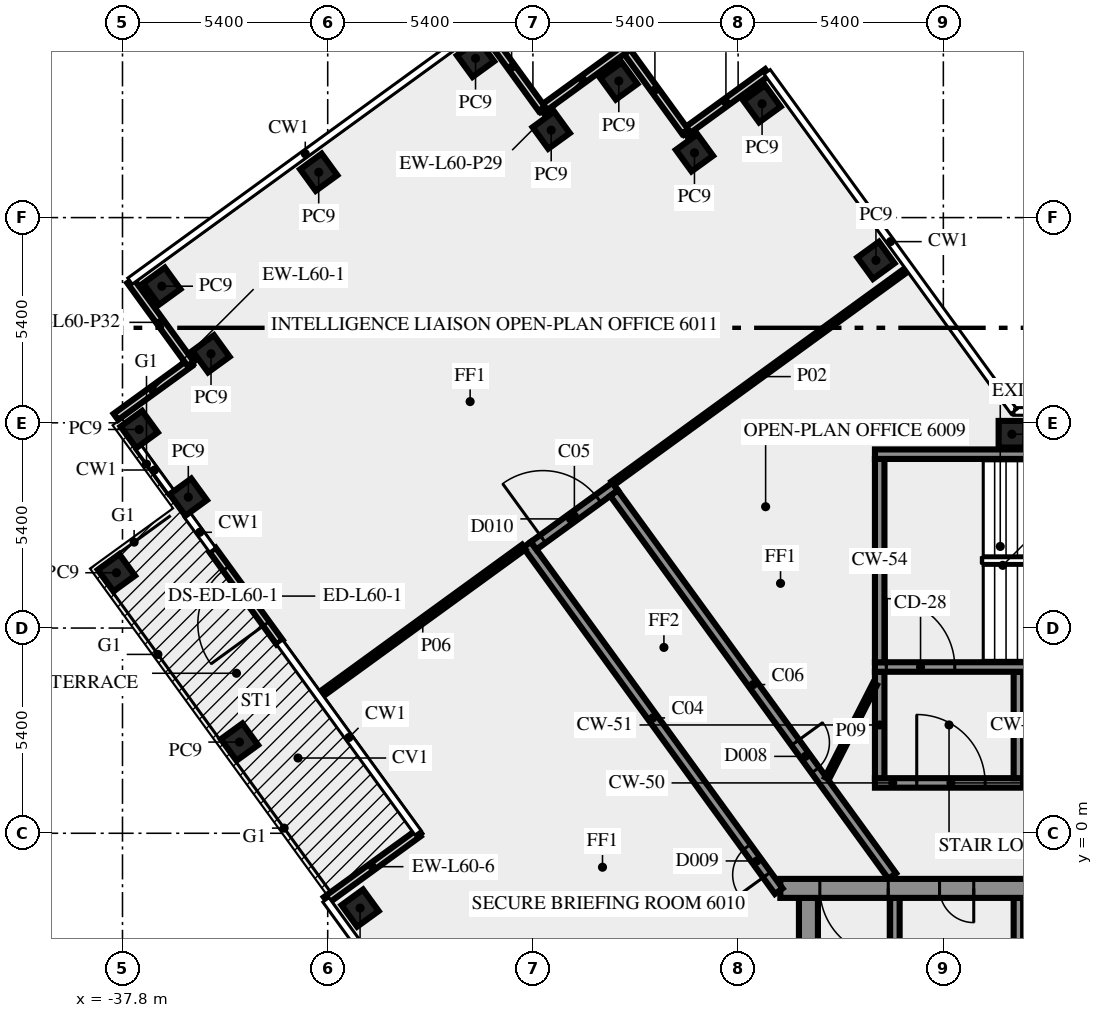
"""IFC4 building model, lengths in metres.
Left out: names, types, materials, properties, quantities, classifications, styles, units other than length and angle.
Written with IfcOpenShell. Run it as: python <this file> out.ifc"""

import sys

from ifc_helpers import new_model, si_unit, direction, frame, frame_2d, origin, origin_2d, place, context, subcontext, project, spatial, rectangle, extrude, element, fill, save


model = new_model("IFC4")
c1 = context("Model", 3, precision=1e-05, world=origin(), true_north=direction((0.0, 1.0)))
c2 = subcontext(c1, "Body", "Model", "MODEL_VIEW")
j1 = project(units=[si_unit("LENGTHUNIT", "METRE"), si_unit("PLANEANGLEUNIT", "RADIAN")], contexts=[c1])
p1 = place(None, origin())
s1 = spatial("IfcSite", under=j1, at=p1, CompositionType="ELEMENT")
p2 = place(p1, origin())
s2 = spatial("IfcBuilding", under=s1, at=p2, CompositionType="ELEMENT")
p3 = place(p2, frame((0.0, 0.0, 257.0)))
s3 = spatial("IfcBuildingStorey", under=s2, at=p3, CompositionType="ELEMENT", Elevation=257.0)
for number, where, z_axis, x_axis in (
    (1, (-17.974, 15.075, 0.0), (0.0, 0.0, 1.0), (-0.588, 0.809, 0.0)),
    (2, (-20.97, 19.195, 0.0), (0.0, 0.0, 1.0), (-0.588, 0.809, 0.0)),
    (3, (-22.749, 17.904, 0.0), (0.0, 0.0, 1.0), (-0.588, 0.809, 0.0)),
    (4, (-24.74, 19.795, 0.0), (0.0, 0.0, 1.0), (-0.588, 0.809, 0.0)),
    (5, (-26.519, 18.5, 0.0), (0.0, 0.0, 1.0), (-0.588, 0.809, 0.0)),
    (6, (-28.51, 20.39, 0.0), (0.0, 0.0, 1.0), (-0.809, -0.588, 0.0)),
    (7, (-32.637, 17.393, 0.0), (0.0, 0.0, 1.0), (-0.809, -0.588, 0.0)),
    (8, (-36.765, 14.395, 0.0), (0.0, 0.0, 1.0), (0.588, -0.809, 0.0)),
    (9, (-35.471, 12.616, 0.0), (0.0, 0.0, 1.0), (-0.809, -0.588, 0.0)),
    (10, (-37.36, 10.625, 0.0), (0.0, 0.0, 1.0), (0.588, -0.809, 0.0)),
    (11, (-36.068, 8.844, 0.0), (0.0, 0.0, 1.0), (0.588, -0.809, 0.0)),
    (12, (-37.96, 6.855, 0.0), (0.0, 0.0, 1.0), (0.588, -0.809, 0.0)),
    (13, (-34.722, 2.4, 0.0), (0.0, 0.0, 1.0), (0.588, -0.809, 0.0)),
    (14, (-31.548, -1.969, 0.0), (0.0, 0.0, 1.0), (0.588, -0.809, 0.0)),
    (15, (-14.395, 10.5, 0.0), (0.0, 0.0, 1.0), (-1.0, 0.0, 0.0)),
):
    element("IfcColumn", number, at=place(p3, frame(where, z_axis=z_axis, x_axis=x_axis)), inside=s3, PredefinedType="COLUMN", context=c2, shape_type="SweptSolid", body=[
        extrude(rectangle(XDim=0.7, YDim=0.7, at=origin_2d()), origin(), (0.0, 0.0, 1.0), 3.65),
    ])
p4 = place(p3, frame((-36.032, 12.369, 0.0), z_axis=(0.0, 0.0, 1.0), x_axis=(-0.809026317077, -0.587772420479, 0.0)))
e16 = element("IfcWall", 16, at=p4, inside=s3, PredefinedType="SOLIDWALL", context=c2, shape_type="SweptSolid", body=[
    extrude(rectangle(XDim=2.4, YDim=0.2, at=frame_2d((1.2, 0.0))), origin(), (0.0, 0.0, 1.0), 3.65),
])
p5 = place(p3, frame((-33.665, 5.028, 0.0), z_axis=(0.0, 0.0, 1.0), x_axis=(-0.587755461469, 0.809038637837, 0.0)))
e17 = element("IfcWall", 17, at=p5, inside=s3, PredefinedType="SOLIDWALL", context=c2, shape_type="SweptSolid", body=[
    extrude(rectangle(XDim=3.0, YDim=0.2, at=frame_2d((1.5, 0.0))), origin(), (0.0, 0.0, 1.0), 3.65),
])
p6 = place(p5, frame((0.6, 0.0, 0.0)))
e18 = element("IfcOpeningElement", 18, at=p6, cuts=e17, PredefinedType="OPENING", context=c2, shape_type="SweptSolid", body=[
    extrude(rectangle(XDim=1.8, YDim=2.4, at=frame_2d((0.9, 1.2))), frame((0.0, 0.11, 0.0), z_axis=(0.0, -1.0, 0.0), x_axis=(1.0, 0.0, 0.0)), (0.0, 0.0, 1.0), 0.22),
])
p7 = place(p3, frame((-30.014, 0.002, 0.0), z_axis=(0.0, 0.0, 1.0), x_axis=(-0.808999938455, -0.587808727036, 0.0)))
e19 = element("IfcWall", 19, at=p7, inside=s3, PredefinedType="SOLIDWALL", context=c2, shape_type="SweptSolid", body=[
    extrude(rectangle(XDim=3.0, YDim=0.2, at=frame_2d((1.5, 0.0))), origin(), (0.0, 0.0, 1.0), 3.65),
])
for number, where, z_axis, x_axis in (
    (20, (-20.829, 20.025, 0.0), (0.0, 0.0, 1.0), (-0.809, -0.588, 0.0)),
    (21, (-22.996, 18.466, 0.0), (0.0, 0.0, 1.0), (-0.588, 0.809, 0.0)),
):
    element("IfcWall", number, at=place(p3, frame(where, z_axis=z_axis, x_axis=x_axis)), inside=s3, PredefinedType="SOLIDWALL", context=c2, shape_type="SweptSolid", body=[
        extrude(rectangle(XDim=2.7, YDim=0.2, at=frame_2d((1.35, 0.0))), origin(), (0.0, 0.0, 1.0), 3.65),
    ])
for number, where, z_axis, x_axis in (
    (22, (-24.6, 20.623, 0.0), (0.0, 0.0, 1.0), (-0.809, -0.588, 0.0)),
    (23, (-26.768, 19.063, 0.0), (0.0, 0.0, 1.0), (-0.588, 0.809, 0.0)),
):
    element("IfcWall", number, at=place(p3, frame(where, z_axis=z_axis, x_axis=x_axis)), inside=s3, PredefinedType="SOLIDWALL", context=c2, shape_type="SweptSolid", body=[
        extrude(rectangle(XDim=2.7, YDim=0.2, at=frame_2d((1.35, 0.0))), origin(), (0.0, 0.0, 1.0), 3.65),
    ])
p8 = place(p3, frame((-37.592, 14.536, 0.0), z_axis=(0.0, 0.0, 1.0), x_axis=(0.587762999008, -0.809033161865, 0.0)))
e24 = element("IfcWall", 24, at=p8, inside=s3, PredefinedType="SOLIDWALL", context=c2, shape_type="SweptSolid", body=[
    extrude(rectangle(XDim=2.7, YDim=0.2, at=frame_2d((1.35, 0.0))), origin(), (0.0, 0.0, 1.0), 3.65),
])
p9 = place(p3, frame((-19.75, -10.5, 0.0), z_axis=(0.0, 0.0, 1.0), x_axis=(0.0, 1.0, 0.0)))
e25 = element("IfcWall", 25, at=p9, inside=s3, PredefinedType="SHEAR", context=c2, shape_type="SweptSolid", body=[
    extrude(rectangle(XDim=8.8, YDim=0.5, at=frame_2d((4.4, 0.0))), origin(), (0.0, 0.0, 1.0), 3.65),
])
p10 = place(p3, frame((-17.475, -6.0, 0.0), z_axis=(0.0, 0.0, 1.0), x_axis=(0.0, 1.0, 0.0)))
e26 = element("IfcWall", 26, at=p10, inside=s3, PredefinedType="SHEAR", context=c2, shape_type="SweptSolid", body=[
    extrude(rectangle(XDim=4.3, YDim=0.25, at=frame_2d((2.15, 0.0))), origin(), (0.0, 0.0, 1.0), 3.65),
])
p11 = place(p10, frame((0.55, 0.0, 0.0)))
e27 = element("IfcOpeningElement", 27, at=p11, cuts=e26, PredefinedType="OPENING", context=c2, shape_type="SweptSolid", body=[
    extrude(rectangle(XDim=1.3, YDim=2.1, at=frame_2d((0.65, 1.05))), frame((0.0, 0.135, 0.0), z_axis=(0.0, -1.0, 0.0), x_axis=(1.0, 0.0, 0.0)), (0.0, 0.0, 1.0), 0.27),
])
p12 = place(p3, frame((-14.225, -3.35, 0.0), z_axis=(0.0, 0.0, 1.0), x_axis=(0.0, 1.0, 0.0)))
e28 = element("IfcWall", 28, at=p12, inside=s3, PredefinedType="SHEAR", context=c2, shape_type="SweptSolid", body=[
    extrude(rectangle(XDim=1.65, YDim=0.25, at=frame_2d((0.825, 0.0))), origin(), (0.0, 0.0, 1.0), 3.65),
])
p13 = place(p3, frame((20.49, -1.45, 0.0), z_axis=(0.0, 0.0, 1.0), x_axis=(-1.0, 0.0, 0.0)))
e29 = element("IfcWall", 29, at=p13, inside=s3, PredefinedType="SHEAR", context=c2, shape_type="SweptSolid", body=[
    extrude(rectangle(XDim=40.98, YDim=0.5, at=frame_2d((20.49, 0.0))), origin(), (0.0, 0.0, 1.0), 3.65),
])
p14 = place(p13, frame((38.14, 0.0, 0.0)))
e30 = element("IfcOpeningElement", 30, at=p14, cuts=e29, PredefinedType="OPENING", context=c2, shape_type="SweptSolid", body=[
    extrude(rectangle(XDim=1.8, YDim=2.1, at=frame_2d((0.9, 1.05))), frame((0.0, 0.26, 0.0), z_axis=(0.0, -1.0, 0.0), x_axis=(1.0, 0.0, 0.0)), (0.0, 0.0, 1.0), 0.52),
])
p15 = place(p13, frame((35.89, 0.0, 0.0)))
e31 = element("IfcOpeningElement", 31, at=p15, cuts=e29, PredefinedType="OPENING", context=c2, shape_type="SweptSolid", body=[
    extrude(rectangle(XDim=0.9, YDim=2.1, at=frame_2d((0.45, 1.05))), frame((0.0, 0.26, 0.0), z_axis=(0.0, -1.0, 0.0), x_axis=(1.0, 0.0, 0.0)), (0.0, 0.0, 1.0), 0.52),
])
p16 = place(p13, frame((32.94, 0.0, 0.0)))
e32 = element("IfcOpeningElement", 32, at=p16, cuts=e29, PredefinedType="OPENING", context=c2, shape_type="SweptSolid", body=[
    extrude(rectangle(XDim=0.9, YDim=2.1, at=frame_2d((0.45, 1.05))), frame((0.0, 0.26, 0.0), z_axis=(0.0, -1.0, 0.0), x_axis=(1.0, 0.0, 0.0)), (0.0, 0.0, 1.0), 0.52),
])
p17 = place(p13, frame((31.015, 0.0, 0.0)))
e33 = element("IfcOpeningElement", 33, at=p17, cuts=e29, PredefinedType="OPENING", context=c2, shape_type="SweptSolid", body=[
    extrude(rectangle(XDim=0.8, YDim=2.1, at=frame_2d((0.4, 1.05))), frame((0.0, 0.26, 0.0), z_axis=(0.0, -1.0, 0.0), x_axis=(1.0, 0.0, 0.0)), (0.0, 0.0, 1.0), 0.52),
])
p18 = place(p13, frame((24.765, 0.0, 0.0)))
e34 = element("IfcOpeningElement", 34, at=p18, cuts=e29, PredefinedType="OPENING", context=c2, shape_type="SweptSolid", body=[
    extrude(rectangle(XDim=0.8, YDim=2.1, at=frame_2d((0.4, 1.05))), frame((0.0, 0.26, 0.0), z_axis=(0.0, -1.0, 0.0), x_axis=(1.0, 0.0, 0.0)), (0.0, 0.0, 1.0), 0.52),
])
p19 = place(p13, frame((21.765, 0.0, 0.0)))
e35 = element("IfcOpeningElement", 35, at=p19, cuts=e29, PredefinedType="OPENING", context=c2, shape_type="SweptSolid", body=[
    extrude(rectangle(XDim=2.0, YDim=2.1, at=frame_2d((1.0, 1.05))), frame((0.0, 0.26, 0.0), z_axis=(0.0, -1.0, 0.0), x_axis=(1.0, 0.0, 0.0)), (0.0, 0.0, 1.0), 0.52),
])
p20 = place(p13, frame((14.202, 0.0, 0.0)))
e36 = element("IfcOpeningElement", 36, at=p20, cuts=e29, PredefinedType="OPENING", context=c2, shape_type="SweptSolid", body=[
    extrude(rectangle(XDim=0.9, YDim=2.1, at=frame_2d((0.45, 1.05))), frame((0.0, 0.26, 0.0), z_axis=(0.0, -1.0, 0.0), x_axis=(1.0, 0.0, 0.0)), (0.0, 0.0, 1.0), 0.52),
])
p21 = place(p13, frame((10.478, 0.0, 0.0)))
e37 = element("IfcOpeningElement", 37, at=p21, cuts=e29, PredefinedType="OPENING", context=c2, shape_type="SweptSolid", body=[
    extrude(rectangle(XDim=0.9, YDim=2.1, at=frame_2d((0.45, 1.05))), frame((0.0, 0.26, 0.0), z_axis=(0.0, -1.0, 0.0), x_axis=(1.0, 0.0, 0.0)), (0.0, 0.0, 1.0), 0.52),
])
p22 = place(p13, frame((7.14, 0.0, 0.0)))
e38 = element("IfcOpeningElement", 38, at=p22, cuts=e29, PredefinedType="OPENING", context=c2, shape_type="SweptSolid", body=[
    extrude(rectangle(XDim=0.9, YDim=2.1, at=frame_2d((0.45, 1.05))), frame((0.0, 0.26, 0.0), z_axis=(0.0, -1.0, 0.0), x_axis=(1.0, 0.0, 0.0)), (0.0, 0.0, 1.0), 0.52),
])
p23 = place(p13, frame((5.028, 0.0, 0.0)))
e39 = element("IfcOpeningElement", 39, at=p23, cuts=e29, PredefinedType="OPENING", context=c2, shape_type="SweptSolid", body=[
    extrude(rectangle(XDim=0.8, YDim=2.1, at=frame_2d((0.4, 1.05))), frame((0.0, 0.26, 0.0), z_axis=(0.0, -1.0, 0.0), x_axis=(1.0, 0.0, 0.0)), (0.0, 0.0, 1.0), 0.52),
])
p24 = place(p13, frame((3.452, 0.0, 0.0)))
e40 = element("IfcOpeningElement", 40, at=p24, cuts=e29, PredefinedType="OPENING", context=c2, shape_type="SweptSolid", body=[
    extrude(rectangle(XDim=0.8, YDim=2.1, at=frame_2d((0.4, 1.05))), frame((0.0, 0.26, 0.0), z_axis=(0.0, -1.0, 0.0), x_axis=(1.0, 0.0, 0.0)), (0.0, 0.0, 1.0), 0.52),
])
p25 = place(p13, frame((1.04, 0.0, 0.0)))
e41 = element("IfcOpeningElement", 41, at=p25, cuts=e29, PredefinedType="OPENING", context=c2, shape_type="SweptSolid", body=[
    extrude(rectangle(XDim=1.8, YDim=2.1, at=frame_2d((0.9, 1.05))), frame((0.0, 0.26, 0.0), z_axis=(0.0, -1.0, 0.0), x_axis=(1.0, 0.0, 0.0)), (0.0, 0.0, 1.0), 0.52),
])
p26 = place(p3, frame((-18.0, 1.325, 0.0), z_axis=(0.0, 0.0, 1.0), x_axis=(1.0, 0.0, 0.0)))
e42 = element("IfcWall", 42, at=p26, inside=s3, PredefinedType="SHEAR", context=c2, shape_type="SweptSolid", body=[
    extrude(rectangle(XDim=3.9, YDim=0.25, at=frame_2d((1.95, 0.0))), origin(), (0.0, 0.0, 1.0), 3.65),
])
p27 = place(p26, frame((1.1, 0.0, 0.0)))
e43 = element("IfcOpeningElement", 43, at=p27, cuts=e42, PredefinedType="OPENING", context=c2, shape_type="SweptSolid", body=[
    extrude(rectangle(XDim=1.8, YDim=2.1, at=frame_2d((0.9, 1.05))), frame((0.0, 0.135, 0.0), z_axis=(0.0, -1.0, 0.0), x_axis=(1.0, 0.0, 0.0)), (0.0, 0.0, 1.0), 0.27),
])
for number, where, z_axis, x_axis in (
    (44, (-17.875, 1.45, 0.0), (0.0, 0.0, 1.0), (0.0, 1.0, 0.0)),
    (45, (-14.225, 1.45, 0.0), (0.0, 0.0, 1.0), (0.0, 1.0, 0.0)),
):
    element("IfcWall", number, at=place(p3, frame(where, z_axis=z_axis, x_axis=x_axis)), inside=s3, PredefinedType="SHEAR", context=c2, shape_type="SweptSolid", body=[
        extrude(rectangle(XDim=2.8, YDim=0.25, at=frame_2d((1.4, 0.0))), origin(), (0.0, 0.0, 1.0), 3.65),
    ])
p28 = place(p3, frame((-18.0, 4.375, 0.0), z_axis=(0.0, 0.0, 1.0), x_axis=(1.0, 0.0, 0.0)))
e46 = element("IfcWall", 46, at=p28, inside=s3, PredefinedType="SHEAR", context=c2, shape_type="SweptSolid", body=[
    extrude(rectangle(XDim=10.5, YDim=0.25, at=frame_2d((5.25, 0.0))), origin(), (0.0, 0.0, 1.0), 3.65),
])
p29 = place(p28, frame((0.3, 0.0, 0.0)))
e47 = element("IfcOpeningElement", 47, at=p29, cuts=e46, PredefinedType="OPENING", context=c2, shape_type="SweptSolid", body=[
    extrude(rectangle(XDim=1.8, YDim=2.1, at=frame_2d((0.9, 1.05))), frame((0.0, 0.135, 0.0), z_axis=(0.0, -1.0, 0.0), x_axis=(1.0, 0.0, 0.0)), (0.0, 0.0, 1.0), 0.27),
])
p30 = place(p3, frame((-17.875, 4.5, 0.0), z_axis=(0.0, 0.0, 1.0), x_axis=(0.0, 1.0, 0.0)))
e48 = element("IfcWall", 48, at=p30, inside=s3, PredefinedType="SHEAR", context=c2, shape_type="SweptSolid", body=[
    extrude(rectangle(XDim=5.35, YDim=0.25, at=frame_2d((2.675, 0.0))), origin(), (0.0, 0.0, 1.0), 3.65),
])
p31 = place(p3, frame((-18.0, 9.975, 0.0), z_axis=(0.0, 0.0, 1.0), x_axis=(1.0, 0.0, 0.0)))
e49 = element("IfcWall", 49, at=p31, inside=s3, PredefinedType="SHEAR", context=c2, shape_type="SweptSolid", body=[
    extrude(rectangle(XDim=10.5, YDim=0.25, at=frame_2d((5.25, 0.0))), origin(), (0.0, 0.0, 1.0), 3.65),
])
p32 = place(p31, frame((4.5, 0.0, 1.0)))
e50 = element("IfcOpeningElement", 50, at=p32, cuts=e49, PredefinedType="OPENING", context=c2, shape_type="SweptSolid", body=[
    extrude(rectangle(XDim=1.2, YDim=1.2, at=frame_2d((0.6, 0.6))), frame((0.0, 0.135, 0.0), z_axis=(0.0, -1.0, 0.0), x_axis=(1.0, 0.0, 0.0)), (0.0, 0.0, 1.0), 0.27),
])
p33 = place(p3, frame((-20.531, -1.523, 0.0), z_axis=(0.0, 0.0, 1.0), x_axis=(-0.587782646447, 0.809018887626, 0.0)))
e51 = element("IfcWall", 51, at=p33, inside=s3, PredefinedType="SOLIDWALL", context=c2, shape_type="SweptSolid", body=[
    extrude(rectangle(XDim=11.27, YDim=0.25, at=frame_2d((5.635, 0.0))), origin(), (0.0, 0.0, 1.0), 3.65),
])
p34 = place(p33, frame((0.533, 0.0, 0.0)))
e52 = element("IfcOpeningElement", 52, at=p34, cuts=e51, PredefinedType="OPENING", context=c2, shape_type="SweptSolid", body=[
    extrude(rectangle(XDim=0.9, YDim=2.1, at=frame_2d((0.45, 1.05))), frame((0.0, 0.135, 0.0), z_axis=(0.0, -1.0, 0.0), x_axis=(1.0, 0.0, 0.0)), (0.0, 0.0, 1.0), 0.27),
])
p35 = place(p3, frame((-26.981, 7.567, 0.0), z_axis=(0.0, 0.0, 1.0), x_axis=(0.809038743598, 0.587755315891, 0.0)))
e53 = element("IfcWall", 53, at=p35, inside=s3, PredefinedType="SOLIDWALL", context=c2, shape_type="SweptSolid", body=[
    extrude(rectangle(XDim=2.65, YDim=0.25, at=frame_2d((1.325, 0.0))), origin(), (0.0, 0.0, 1.0), 3.65),
])
p36 = place(p35, frame((0.3, 0.0, 0.0)))
e54 = element("IfcOpeningElement", 54, at=p36, cuts=e53, PredefinedType="OPENING", context=c2, shape_type="SweptSolid", body=[
    extrude(rectangle(XDim=1.8, YDim=2.1, at=frame_2d((0.9, 1.05))), frame((0.0, 0.135, 0.0), z_axis=(0.0, -1.0, 0.0), x_axis=(1.0, 0.0, 0.0)), (0.0, 0.0, 1.0), 0.27),
])
p37 = place(p3, frame((-24.865, 8.95, 0.0), z_axis=(0.0, 0.0, 1.0), x_axis=(0.587791617212, -0.809012369952, 0.0)))
e55 = element("IfcWall", 55, at=p37, inside=s3, PredefinedType="SOLIDWALL", context=c2, shape_type="SweptSolid", body=[
    extrude(rectangle(XDim=12.453, YDim=0.25, at=frame_2d((6.227, 0.0))), origin(), (0.0, 0.0, 1.0), 3.65),
])
p38 = place(p37, frame((8.112, 0.0, 0.0)))
e56 = element("IfcOpeningElement", 56, at=p38, cuts=e55, PredefinedType="OPENING", context=c2, shape_type="SweptSolid", body=[
    extrude(rectangle(XDim=0.9, YDim=2.1, at=frame_2d((0.45, 1.05))), frame((0.0, 0.135, 0.0), z_axis=(0.0, -1.0, 0.0), x_axis=(1.0, 0.0, 0.0)), (0.0, 0.0, 1.0), 0.27),
])
p39 = place(p3, frame((-17.172, 14.822, 0.0), z_axis=(0.0, 0.0, 1.0), x_axis=(-0.809046636998, -0.587744450559, 0.0)))
e57 = element("IfcWall", 57, at=p39, inside=s3, PredefinedType="PARTITIONING", context=c2, shape_type="SweptSolid", body=[
    extrude(rectangle(XDim=9.549, YDim=0.12, at=frame_2d((4.775, 0.0))), origin(), (0.0, 0.0, 1.0), 2.95),
])
p40 = place(p3, frame((-32.556, 3.671, 0.0), z_axis=(0.0, 0.0, 1.0), x_axis=(0.809057351259, 0.587729701796, 0.0)))
e58 = element("IfcWall", 58, at=p40, inside=s3, PredefinedType="PARTITIONING", context=c2, shape_type="SweptSolid", body=[
    extrude(rectangle(XDim=6.57, YDim=0.15, at=frame_2d((3.285, 0.0))), origin(), (0.0, 0.0, 1.0), 3.65),
])
p41 = place(p3, frame((-19.261, 1.45, 0.0), z_axis=(0.0, 0.0, 1.0), x_axis=(0.453950796792, 0.891026752736, 0.0)))
e59 = element("IfcWall", 59, at=p41, inside=s3, PredefinedType="PARTITIONING", context=c2, shape_type="SweptSolid", body=[
    extrude(rectangle(XDim=2.778, YDim=0.12, at=frame_2d((1.389, 0.0))), origin(), (0.0, 0.0, 1.0), 3.65),
])
p42 = place(p6, origin())
e60 = element("IfcDoor", 60, at=p42, inside=s3, OperationType="DOUBLE_DOOR_SINGLE_SWING", PredefinedType="DOOR", context=c2, shape_type="SweptSolid", body=[
    extrude(rectangle(XDim=1.8, YDim=2.4, at=frame_2d((0.9, 1.2))), frame((0.0, 0.025, 0.0), z_axis=(0.0, -1.0, 0.0), x_axis=(1.0, 0.0, 0.0)), (0.0, 0.0, 1.0), 0.05),
])
fill(e18, e60)
p43 = place(p14, origin())
e61 = element("IfcDoor", 61, at=p43, inside=s3, OperationType="DOUBLE_DOOR_SINGLE_SWING", PredefinedType="DOOR", context=c2, shape_type="SweptSolid", body=[
    extrude(rectangle(XDim=1.8, YDim=2.1, at=frame_2d((0.9, 1.05))), frame((0.0, 0.025, 0.0), z_axis=(0.0, -1.0, 0.0), x_axis=(1.0, 0.0, 0.0)), (0.0, 0.0, 1.0), 0.05),
])
fill(e30, e61)
p44 = place(p15, origin())
e62 = element("IfcDoor", 62, at=p44, inside=s3, OperationType="SINGLE_SWING_RIGHT", PredefinedType="DOOR", context=c2, shape_type="SweptSolid", body=[
    extrude(rectangle(XDim=0.9, YDim=2.1, at=frame_2d((0.45, 1.05))), frame((0.0, 0.025, 0.0), z_axis=(0.0, -1.0, 0.0), x_axis=(1.0, 0.0, 0.0)), (0.0, 0.0, 1.0), 0.05),
])
fill(e31, e62)
p45 = place(p27, origin())
e63 = element("IfcDoor", 63, at=p45, inside=s3, OperationType="DOUBLE_DOOR_SINGLE_SWING", PredefinedType="DOOR", context=c2, shape_type="SweptSolid", body=[
    extrude(rectangle(XDim=1.8, YDim=2.1, at=frame_2d((0.9, 1.05))), frame((0.0, 0.025, 0.0), z_axis=(0.0, -1.0, 0.0), x_axis=(1.0, 0.0, 0.0)), (0.0, 0.0, 1.0), 0.05),
])
fill(e43, e63)
p46 = place(p29, origin())
e64 = element("IfcDoor", 64, at=p46, inside=s3, OperationType="DOUBLE_DOOR_SINGLE_SWING", PredefinedType="DOOR", context=c2, shape_type="SweptSolid", body=[
    extrude(rectangle(XDim=1.8, YDim=2.1, at=frame_2d((0.9, 1.05))), frame((0.0, 0.025, 0.0), z_axis=(0.0, -1.0, 0.0), x_axis=(1.0, 0.0, 0.0)), (0.0, 0.0, 1.0), 0.05),
])
fill(e47, e64)
p47 = place(p38, origin())
e65 = element("IfcDoor", 65, at=p47, inside=s3, OperationType="SINGLE_SWING_RIGHT", PredefinedType="DOOR", context=c2, shape_type="SweptSolid", body=[
    extrude(rectangle(XDim=0.9, YDim=2.1, at=frame_2d((0.45, 1.05))), frame((0.0, 0.025, 0.0), z_axis=(0.0, -1.0, 0.0), x_axis=(1.0, 0.0, 0.0)), (0.0, 0.0, 1.0), 0.05),
])
fill(e56, e65)
p48 = place(p36, origin())
e66 = element("IfcDoor", 66, at=p48, inside=s3, OperationType="DOUBLE_DOOR_SINGLE_SWING", PredefinedType="DOOR", context=c2, shape_type="SweptSolid", body=[
    extrude(rectangle(XDim=1.8, YDim=2.1, at=frame_2d((0.9, 1.05))), frame((0.0, 0.025, 0.0), z_axis=(0.0, -1.0, 0.0), x_axis=(1.0, 0.0, 0.0)), (0.0, 0.0, 1.0), 0.05),
])
fill(e54, e66)
p49 = place(p34, origin())
e67 = element("IfcDoor", 67, at=p49, inside=s3, OperationType="SINGLE_SWING_LEFT", PredefinedType="DOOR", context=c2, shape_type="SweptSolid", body=[
    extrude(rectangle(XDim=0.9, YDim=2.1, at=frame_2d((0.45, 1.05))), frame((0.0, 0.025, 0.0), z_axis=(0.0, -1.0, 0.0), x_axis=(1.0, 0.0, 0.0)), (0.0, 0.0, 1.0), 0.05),
])
fill(e52, e67)
save(model, sys.argv[1])
